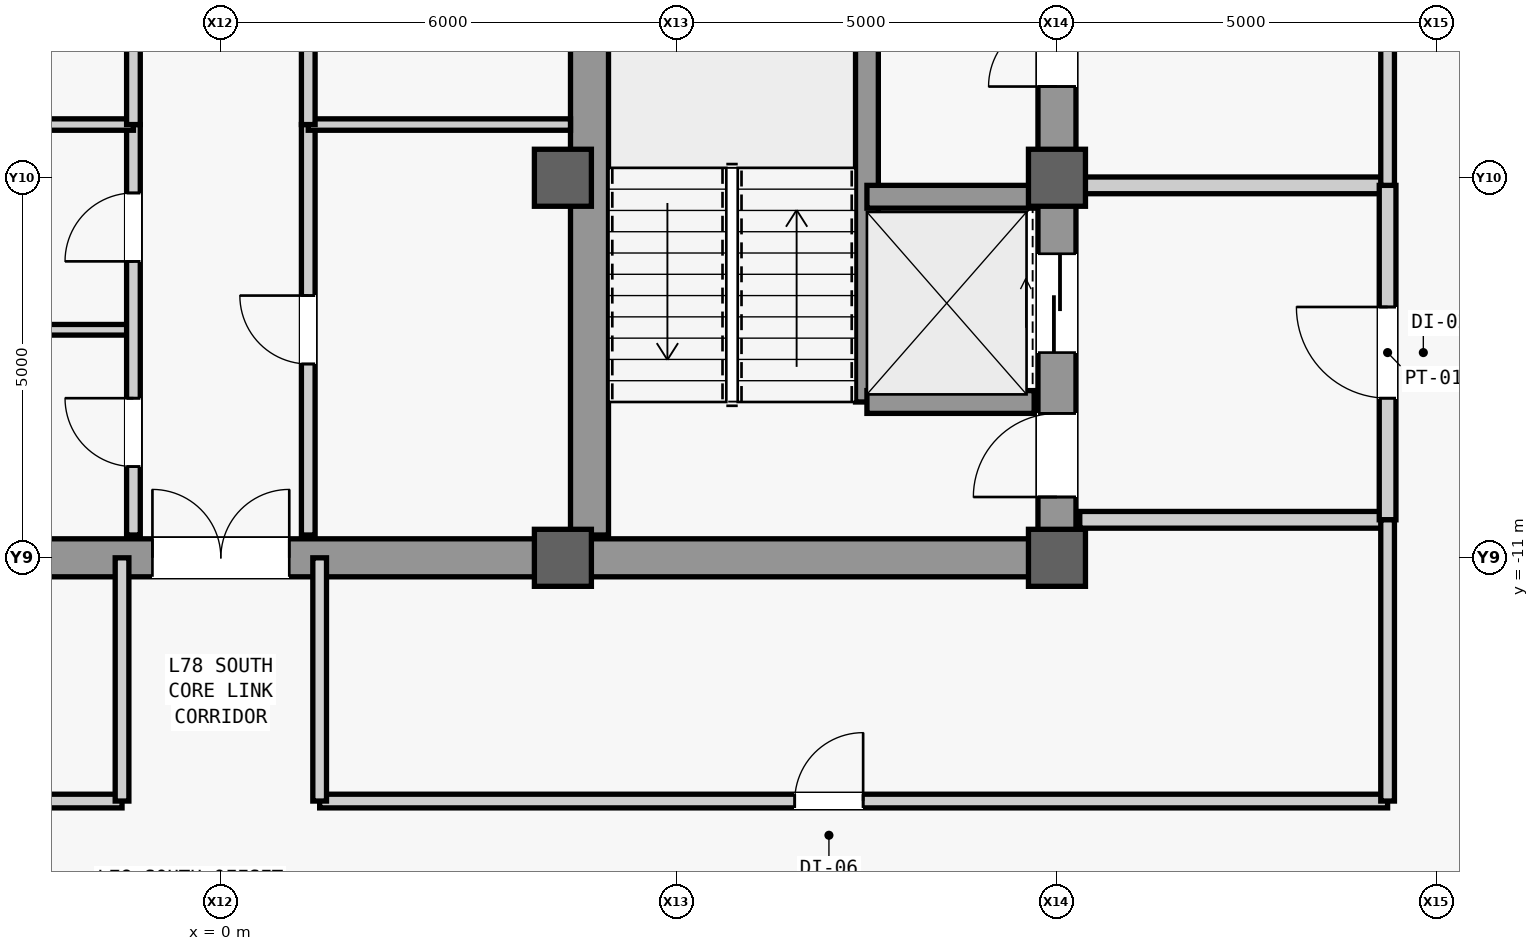
"""IFC4 building model, lengths in metres.
Left out: names, types, materials, properties, quantities, classifications, styles, units other than length and angle.
Written with IfcOpenShell. Run it as: python <this file> out.ifc"""

import sys

from ifc_helpers import new_model, si_unit, direction, frame, frame_2d, origin, origin_2d, place, context, subcontext, project, spatial, rectangle, extrude, source, transform, mapped, element, fill, save


model = new_model("IFC4")
c1 = context("Model", 3, precision=1e-05, world=origin(), true_north=direction((0.0, 1.0)))
c2 = subcontext(c1, "Body", "Model", "MODEL_VIEW")
j1 = project(units=[si_unit("LENGTHUNIT", "METRE"), si_unit("PLANEANGLEUNIT", "RADIAN")], contexts=[c1])
p1 = place(None, origin())
s1 = spatial("IfcSite", under=j1, at=p1, CompositionType="ELEMENT")
p2 = place(p1, origin())
s2 = spatial("IfcBuilding", under=s1, at=p2, CompositionType="ELEMENT")
p3 = place(p2, frame((0.0, 0.0, 330.3)))
s3 = spatial("IfcBuildingStorey", under=s2, at=p3, CompositionType="ELEMENT", Elevation=330.3)
m1 = source(origin(), c2, "Body", "SweptSolid", [
    extrude(rectangle(XDim=22.0, YDim=0.5, at=frame_2d((11.0, 0.0))), origin(), (0.0, 0.0, 1.0), 3.74),
])
p4 = place(p3, frame((11.0, -11.0, 0.0), z_axis=(0.0, 0.0, 1.0), x_axis=(0.0, 1.0, 0.0)))
e1 = element("IfcWall", 1, at=p4, inside=s3, PredefinedType="SHEAR", context=c2, shape_type="MappedRepresentation", body=[
    mapped(m1, transform((0.0, 0.0, 0.0), scale=1.0)),
])
m2 = source(origin(), c2, "Body", "SweptSolid", [
    extrude(rectangle(XDim=1.1, YDim=2.2, at=frame_2d((0.55, 1.1))), frame((0.0, 0.26, 0.0), z_axis=(0.0, -1.0, 0.0), x_axis=(1.0, 0.0, 0.0)), (0.0, 0.0, 1.0), 0.52),
])
p5 = place(p4, frame((0.8, 0.0, 0.0)))
e2 = element("IfcOpeningElement", 2, at=p5, cuts=e1, PredefinedType="OPENING", context=c2, shape_type="MappedRepresentation", body=[
    mapped(m2, transform((0.0, 0.0, 0.0), scale=1.0)),
])
m3 = source(origin(), c2, "Body", "SweptSolid", [
    extrude(rectangle(XDim=0.9, YDim=2.15, at=frame_2d((0.45, 1.075))), frame((0.0, 0.26, 0.0), z_axis=(0.0, -1.0, 0.0), x_axis=(1.0, 0.0, 0.0)), (0.0, 0.0, 1.0), 0.52),
])
p6 = place(p4, frame((6.2, 0.0, 0.0)))
e3 = element("IfcOpeningElement", 3, at=p6, cuts=e1, PredefinedType="OPENING", context=c2, shape_type="MappedRepresentation", body=[
    mapped(m3, transform((0.0, 0.0, 0.0), scale=1.0)),
])
p7 = place(p4, frame((8.05, 0.0, 0.0)))
e4 = element("IfcOpeningElement", 4, at=p7, cuts=e1, PredefinedType="OPENING", context=c2, shape_type="MappedRepresentation", body=[
    mapped(m3, transform((0.0, 0.0, 0.0), scale=1.0)),
])
m4 = source(origin(), c2, "Body", "SweptSolid", [
    extrude(rectangle(XDim=1.2, YDim=2.3, at=frame_2d((0.6, 1.15))), frame((0.0, 0.26, 0.0), z_axis=(0.0, -1.0, 0.0), x_axis=(1.0, 0.0, 0.0)), (0.0, 0.0, 1.0), 0.52),
])
p8 = place(p4, frame((17.6, 0.0, 0.0)))
e5 = element("IfcOpeningElement", 5, at=p8, cuts=e1, PredefinedType="OPENING", context=c2, shape_type="MappedRepresentation", body=[
    mapped(m4, transform((0.0, 0.0, 0.0), scale=1.0)),
])
p9 = place(p4, frame((19.6, 0.0, 0.0)))
e6 = element("IfcOpeningElement", 6, at=p9, cuts=e1, PredefinedType="OPENING", context=c2, shape_type="MappedRepresentation", body=[
    mapped(m4, transform((0.0, 0.0, 0.0), scale=1.0)),
])
m5 = source(origin(), c2, "Body", "SweptSolid", [
    extrude(rectangle(XDim=1.3, YDim=2.3, at=frame_2d((0.65, 1.15))), frame((0.0, 0.26, 0.0), z_axis=(0.0, -1.0, 0.0), x_axis=(1.0, 0.0, 0.0)), (0.0, 0.0, 1.0), 0.52),
])
p10 = place(p4, frame((2.7, 0.0, 0.0)))
e7 = element("IfcOpeningElement", 7, at=p10, cuts=e1, PredefinedType="OPENING", context=c2, shape_type="MappedRepresentation", body=[
    mapped(m5, transform((0.0, 0.0, 0.0), scale=1.0)),
])
p11 = place(p4, frame((13.35, 0.0, 0.0)))
e8 = element("IfcOpeningElement", 8, at=p11, cuts=e1, PredefinedType="OPENING", context=c2, shape_type="MappedRepresentation", body=[
    mapped(m5, transform((0.0, 0.0, 0.0), scale=1.0)),
])
m6 = source(origin(), c2, "Body", "SweptSolid", [
    extrude(rectangle(XDim=21.4, YDim=0.5, at=frame_2d((10.7, 0.0))), origin(), (0.0, 0.0, 1.0), 3.74),
])
p12 = place(p3, frame((4.85, -10.7, 0.0), z_axis=(0.0, 0.0, 1.0), x_axis=(0.0, 1.0, 0.0)))
e9 = element("IfcWall", 9, at=p12, inside=s3, PredefinedType="SHEAR", context=c2, shape_type="MappedRepresentation", body=[
    mapped(m6, transform((0.0, 0.0, 0.0), scale=1.0)),
])
m7 = source(origin(), c2, "Body", "SweptSolid", [
    extrude(rectangle(XDim=5.9, YDim=0.5, at=frame_2d((2.95, 0.0))), origin(), (0.0, 0.0, 1.0), 3.74),
])
p13 = place(p3, frame((4.85, -11.0, 0.0), z_axis=(0.0, 0.0, 1.0), x_axis=(1.0, 0.0, 0.0)))
e10 = element("IfcWall", 10, at=p13, inside=s3, PredefinedType="SHEAR", context=c2, shape_type="MappedRepresentation", body=[
    mapped(m7, transform((0.0, 0.0, 0.0), scale=1.0)),
])
m8 = source(origin(), c2, "Body", "SweptSolid", [
    extrude(rectangle(XDim=9.2, YDim=0.5, at=frame_2d((4.6, 0.0))), origin(), (0.0, 0.0, 1.0), 3.74),
])
p14 = place(p3, frame((-4.6, -11.0, 0.0), z_axis=(0.0, 0.0, 1.0), x_axis=(1.0, 0.0, 0.0)))
e11 = element("IfcWall", 11, at=p14, inside=s3, PredefinedType="SHEAR", context=c2, shape_type="MappedRepresentation", body=[
    mapped(m8, transform((0.0, 0.0, 0.0), scale=1.0)),
])
m9 = source(origin(), c2, "Body", "SweptSolid", [
    extrude(rectangle(XDim=1.8, YDim=2.25, at=frame_2d((0.9, 1.125))), frame((0.0, 0.26, 0.0), z_axis=(0.0, -1.0, 0.0), x_axis=(1.0, 0.0, 0.0)), (0.0, 0.0, 1.0), 0.52),
])
p15 = place(p14, frame((3.7, 0.0, 0.0)))
e12 = element("IfcOpeningElement", 12, at=p15, cuts=e11, PredefinedType="OPENING", context=c2, shape_type="MappedRepresentation", body=[
    mapped(m9, transform((0.0, 0.0, 0.0), scale=1.0)),
])
m10 = source(origin(), c2, "Body", "SweptSolid", [
    extrude(rectangle(XDim=0.75, YDim=0.75, at=origin_2d()), origin(), (0.0, 0.0, 1.0), 4.0),
])
for number, where, z_axis, x_axis in (
    (13, (4.5, -11.0, 0.0), (0.0, 0.0, 1.0), (1.0, 0.0, 0.0)),
    (14, (4.5, -6.0, 0.0), (0.0, 0.0, 1.0), (1.0, 0.0, 0.0)),
    (15, (11.0, -11.0, 0.0), (0.0, 0.0, 1.0), (1.0, 0.0, 0.0)),
    (16, (11.0, -6.0, 0.0), (0.0, 0.0, 1.0), (1.0, 0.0, 0.0)),
):
    element("IfcColumn", number, at=place(p3, frame(where, z_axis=z_axis, x_axis=x_axis)), inside=s3, PredefinedType="COLUMN", context=c2, shape_type="MappedRepresentation", body=[
        mapped(m10, transform((0.0, 0.0, 0.0), scale=1.0)),
    ])
m11 = source(origin(), c2, "Body", "SweptSolid", [
    extrude(rectangle(XDim=7.8, YDim=0.3, at=frame_2d((3.9, 0.0))), origin(), (0.0, 0.0, 1.0), 3.74),
])
p16 = place(p3, frame((8.5, -8.95, 0.0), z_axis=(0.0, 0.0, 1.0), x_axis=(0.0, 1.0, 0.0)))
e17 = element("IfcWall", 17, at=p16, inside=s3, PredefinedType="SHEAR", context=c2, shape_type="MappedRepresentation", body=[
    mapped(m11, transform((0.0, 0.0, 0.0), scale=1.0)),
])
m12 = source(origin(), c2, "Body", "SweptSolid", [
    extrude(rectangle(XDim=2.2, YDim=0.3, at=frame_2d((1.1, 0.0))), origin(), (0.0, 0.0, 1.0), 3.74),
])
for number, where, z_axis, x_axis in (
    (18, (8.5, -8.95, 0.0), (0.0, 0.0, 1.0), (1.0, 0.0, 0.0)),
    (19, (8.5, -6.25, 0.0), (0.0, 0.0, 1.0), (1.0, 0.0, 0.0)),
):
    element("IfcWall", number, at=place(p3, frame(where, z_axis=z_axis, x_axis=x_axis)), inside=s3, PredefinedType="SHEAR", context=c2, shape_type="MappedRepresentation", body=[
        mapped(m12, transform((0.0, 0.0, 0.0), scale=1.0)),
    ])
m13 = source(origin(), c2, "Body", "SweptSolid", [
    extrude(rectangle(XDim=4.05, YDim=0.22, at=frame_2d((2.025, 0.0))), origin(), (0.0, 0.0, 1.0), 3.74),
])
p17 = place(p3, frame((11.3, -10.5, 0.0), z_axis=(0.0, 0.0, 1.0), x_axis=(1.0, 0.0, 0.0)))
e20 = element("IfcWall", 20, at=p17, inside=s3, PredefinedType="PARTITIONING", context=c2, shape_type="MappedRepresentation", body=[
    mapped(m13, transform((0.0, 0.0, 0.0), scale=1.0)),
])
m14 = source(origin(), c2, "Body", "SweptSolid", [
    extrude(rectangle(XDim=4.05, YDim=0.22, at=frame_2d((2.025, 0.0))), origin(), (0.0, 0.0, 1.0), 3.124),
])
p18 = place(p3, frame((11.3, -6.1, 0.0), z_axis=(0.0, 0.0, 1.0), x_axis=(1.0, 0.0, 0.0)))
e21 = element("IfcWall", 21, at=p18, inside=s3, PredefinedType="PARTITIONING", context=c2, shape_type="MappedRepresentation", body=[
    mapped(m14, transform((0.0, 0.0, 0.0), scale=1.0)),
])
m15 = source(origin(), c2, "Body", "SweptSolid", [
    extrude(rectangle(XDim=4.4, YDim=0.22, at=frame_2d((2.2, 0.0))), origin(), (0.0, 0.0, 1.0), 3.74),
])
p19 = place(p3, frame((15.35, -10.5, 0.0), z_axis=(0.0, 0.0, 1.0), x_axis=(0.0, 1.0, 0.0)))
e22 = element("IfcWall", 22, at=p19, inside=s3, PredefinedType="PARTITIONING", context=c2, shape_type="MappedRepresentation", body=[
    mapped(m15, transform((0.0, 0.0, 0.0), scale=1.0)),
])
m16 = source(origin(), c2, "Body", "SweptSolid", [
    extrude(rectangle(XDim=1.2, YDim=2.2, at=frame_2d((0.6, 1.1))), frame((0.0, 0.12, 0.0), z_axis=(0.0, -1.0, 0.0), x_axis=(1.0, 0.0, 0.0)), (0.0, 0.0, 1.0), 0.24),
])
p20 = place(p19, frame((1.6, 0.0, 0.0)))
e23 = element("IfcOpeningElement", 23, at=p20, cuts=e22, PredefinedType="OPENING", context=c2, shape_type="MappedRepresentation", body=[
    mapped(m16, transform((0.0, 0.0, 0.0), scale=1.0)),
])
m17 = source(origin(), c2, "Body", "SweptSolid", [
    extrude(rectangle(XDim=16.6, YDim=0.18, at=frame_2d((8.3, 0.0))), origin(), (0.0, 0.0, 1.0), 3.74),
])
p21 = place(p3, frame((15.35, -6.1, 0.0), z_axis=(0.0, 0.0, 1.0), x_axis=(0.0, 1.0, 0.0)))
e24 = element("IfcWall", 24, at=p21, inside=s3, PredefinedType="PARTITIONING", context=c2, shape_type="MappedRepresentation", body=[
    mapped(m17, transform((0.0, 0.0, 0.0), scale=1.0)),
])
m18 = source(origin(), c2, "Body", "SweptSolid", [
    extrude(rectangle(XDim=1.8, YDim=2.25, at=frame_2d((0.9, 1.125))), frame((0.0, 0.1, 0.0), z_axis=(0.0, -1.0, 0.0), x_axis=(1.0, 0.0, 0.0)), (0.0, 0.0, 1.0), 0.2),
])
p22 = place(p21, frame((2.7, 0.0, 0.0)))
e25 = element("IfcOpeningElement", 25, at=p22, cuts=e24, PredefinedType="OPENING", context=c2, shape_type="MappedRepresentation", body=[
    mapped(m18, transform((0.0, 0.0, 0.0), scale=1.0)),
])
p23 = place(p21, frame((13.0, 0.0, 0.0)))
e26 = element("IfcOpeningElement", 26, at=p23, cuts=e24, PredefinedType="OPENING", context=c2, shape_type="MappedRepresentation", body=[
    mapped(m18, transform((0.0, 0.0, 0.0), scale=1.0)),
])
m19 = source(origin(), c2, "Body", "SweptSolid", [
    extrude(rectangle(XDim=3.45, YDim=0.14, at=frame_2d((1.725, 0.0))), origin(), (0.0, 0.0, 1.0), 3.74),
])
p24 = place(p3, frame((-4.6, -8.0, 0.0), z_axis=(0.0, 0.0, 1.0), x_axis=(1.0, 0.0, 0.0)))
e27 = element("IfcWall", 27, at=p24, inside=s3, PredefinedType="PARTITIONING", context=c2, shape_type="MappedRepresentation", body=[
    mapped(m19, transform((0.0, 0.0, 0.0), scale=1.0)),
])
m20 = source(origin(), c2, "Body", "SweptSolid", [
    extrude(rectangle(XDim=5.4, YDim=0.18, at=frame_2d((2.7, 0.0))), origin(), (0.0, 0.0, 1.0), 3.74),
])
p25 = place(p3, frame((-1.15, -10.7, 0.0), z_axis=(0.0, 0.0, 1.0), x_axis=(0.0, 1.0, 0.0)))
e28 = element("IfcWall", 28, at=p25, inside=s3, PredefinedType="PARTITIONING", context=c2, shape_type="MappedRepresentation", body=[
    mapped(m20, transform((0.0, 0.0, 0.0), scale=1.0)),
])
m21 = source(origin(), c2, "Body", "SweptSolid", [
    extrude(rectangle(XDim=0.9, YDim=2.15, at=frame_2d((0.45, 1.075))), frame((0.0, 0.1, 0.0), z_axis=(0.0, -1.0, 0.0), x_axis=(1.0, 0.0, 0.0)), (0.0, 0.0, 1.0), 0.2),
])
p26 = place(p25, frame((0.9, 0.0, 0.0)))
e29 = element("IfcOpeningElement", 29, at=p26, cuts=e28, PredefinedType="OPENING", context=c2, shape_type="MappedRepresentation", body=[
    mapped(m21, transform((0.0, 0.0, 0.0), scale=1.0)),
])
p27 = place(p25, frame((3.6, 0.0, 0.0)))
e30 = element("IfcOpeningElement", 30, at=p27, cuts=e28, PredefinedType="OPENING", context=c2, shape_type="MappedRepresentation", body=[
    mapped(m21, transform((0.0, 0.0, 0.0), scale=1.0)),
])
p28 = place(p3, frame((1.15, -10.7, 0.0), z_axis=(0.0, 0.0, 1.0), x_axis=(0.0, 1.0, 0.0)))
e31 = element("IfcWall", 31, at=p28, inside=s3, PredefinedType="PARTITIONING", context=c2, shape_type="MappedRepresentation", body=[
    mapped(m20, transform((0.0, 0.0, 0.0), scale=1.0)),
])
p29 = place(p28, frame((2.25, 0.0, 0.0)))
e32 = element("IfcOpeningElement", 32, at=p29, cuts=e31, PredefinedType="OPENING", context=c2, shape_type="MappedRepresentation", body=[
    mapped(m21, transform((0.0, 0.0, 0.0), scale=1.0)),
])
m22 = source(origin(), c2, "Body", "SweptSolid", [
    extrude(rectangle(XDim=3.45, YDim=0.15, at=frame_2d((1.725, 0.0))), origin(), (0.0, 0.0, 1.0), 3.74),
])
for number, where, z_axis, x_axis in (
    (33, (-4.6, -5.3, 0.0), (0.0, 0.0, 1.0), (1.0, 0.0, 0.0)),
    (34, (1.15, -5.3, 0.0), (0.0, 0.0, 1.0), (1.0, 0.0, 0.0)),
):
    element("IfcWall", number, at=place(p3, frame(where, z_axis=z_axis, x_axis=x_axis)), inside=s3, PredefinedType="PARTITIONING", context=c2, shape_type="MappedRepresentation", body=[
        mapped(m22, transform((0.0, 0.0, 0.0), scale=1.0)),
    ])
m23 = source(origin(), c2, "Body", "SweptSolid", [
    extrude(rectangle(XDim=10.6, YDim=0.18, at=frame_2d((5.3, 0.0))), origin(), (0.0, 0.0, 1.0), 3.74),
])
p30 = place(p3, frame((-1.15, -5.3, 0.0), z_axis=(0.0, 0.0, 1.0), x_axis=(0.0, 1.0, 0.0)))
e35 = element("IfcWall", 35, at=p30, inside=s3, PredefinedType="PARTITIONING", context=c2, shape_type="MappedRepresentation", body=[
    mapped(m23, transform((0.0, 0.0, 0.0), scale=1.0)),
])
p31 = place(p30, frame((1.3, 0.0, 0.0)))
e36 = element("IfcOpeningElement", 36, at=p31, cuts=e35, PredefinedType="OPENING", context=c2, shape_type="MappedRepresentation", body=[
    mapped(m21, transform((0.0, 0.0, 0.0), scale=1.0)),
])
p32 = place(p30, frame((4.9, 0.0, 0.0)))
e37 = element("IfcOpeningElement", 37, at=p32, cuts=e35, PredefinedType="OPENING", context=c2, shape_type="MappedRepresentation", body=[
    mapped(m21, transform((0.0, 0.0, 0.0), scale=1.0)),
])
p33 = place(p30, frame((7.8, 0.0, 0.0)))
e38 = element("IfcOpeningElement", 38, at=p33, cuts=e35, PredefinedType="OPENING", context=c2, shape_type="MappedRepresentation", body=[
    mapped(m21, transform((0.0, 0.0, 0.0), scale=1.0)),
])
p34 = place(p30, frame((9.475, 0.0, 0.0)))
e39 = element("IfcOpeningElement", 39, at=p34, cuts=e35, PredefinedType="OPENING", context=c2, shape_type="MappedRepresentation", body=[
    mapped(m21, transform((0.0, 0.0, 0.0), scale=1.0)),
])
p35 = place(p3, frame((1.15, -5.3, 0.0), z_axis=(0.0, 0.0, 1.0), x_axis=(0.0, 1.0, 0.0)))
e40 = element("IfcWall", 40, at=p35, inside=s3, PredefinedType="PARTITIONING", context=c2, shape_type="MappedRepresentation", body=[
    mapped(m23, transform((0.0, 0.0, 0.0), scale=1.0)),
])
p36 = place(p35, frame((4.2, 0.0, 0.0)))
e41 = element("IfcOpeningElement", 41, at=p36, cuts=e40, PredefinedType="OPENING", context=c2, shape_type="MappedRepresentation", body=[
    mapped(m21, transform((0.0, 0.0, 0.0), scale=1.0)),
])
p37 = place(p35, frame((9.475, 0.0, 0.0)))
e42 = element("IfcOpeningElement", 42, at=p37, cuts=e40, PredefinedType="OPENING", context=c2, shape_type="MappedRepresentation", body=[
    mapped(m21, transform((0.0, 0.0, 0.0), scale=1.0)),
])
m24 = source(origin(), c2, "Body", "SweptSolid", [
    extrude(rectangle(XDim=16.1, YDim=0.18, at=frame_2d((8.05, 0.0))), origin(), (0.0, 0.0, 1.0), 3.74),
])
p38 = place(p3, frame((-17.4, -14.2, 0.0), z_axis=(0.0, 0.0, 1.0), x_axis=(1.0, 0.0, 0.0)))
e43 = element("IfcWall", 43, at=p38, inside=s3, PredefinedType="PARTITIONING", context=c2, shape_type="MappedRepresentation", body=[
    mapped(m24, transform((0.0, 0.0, 0.0), scale=1.0)),
])
p39 = place(p38, frame((8.95, 0.0, 0.0)))
e44 = element("IfcOpeningElement", 44, at=p39, cuts=e43, PredefinedType="OPENING", context=c2, shape_type="MappedRepresentation", body=[
    mapped(m21, transform((0.0, 0.0, 0.0), scale=1.0)),
])
m25 = source(origin(), c2, "Body", "SweptSolid", [
    extrude(rectangle(XDim=3.2, YDim=0.18, at=frame_2d((1.6, 0.0))), origin(), (0.0, 0.0, 1.0), 3.74),
])
p40 = place(p3, frame((-1.3, -14.2, 0.0), z_axis=(0.0, 0.0, 1.0), x_axis=(0.0, 1.0, 0.0)))
e45 = element("IfcWall", 45, at=p40, inside=s3, PredefinedType="PARTITIONING", context=c2, shape_type="MappedRepresentation", body=[
    mapped(m25, transform((0.0, 0.0, 0.0), scale=1.0)),
])
m26 = source(origin(), c2, "Body", "SweptSolid", [
    extrude(rectangle(XDim=14.05, YDim=0.18, at=frame_2d((7.025, 0.0))), origin(), (0.0, 0.0, 1.0), 3.74),
])
p41 = place(p3, frame((1.3, -14.2, 0.0), z_axis=(0.0, 0.0, 1.0), x_axis=(1.0, 0.0, 0.0)))
e46 = element("IfcWall", 46, at=p41, inside=s3, PredefinedType="PARTITIONING", context=c2, shape_type="MappedRepresentation", body=[
    mapped(m26, transform((0.0, 0.0, 0.0), scale=1.0)),
])
p42 = place(p41, frame((6.25, 0.0, 0.0)))
e47 = element("IfcOpeningElement", 47, at=p42, cuts=e46, PredefinedType="OPENING", context=c2, shape_type="MappedRepresentation", body=[
    mapped(m21, transform((0.0, 0.0, 0.0), scale=1.0)),
])
p43 = place(p3, frame((1.3, -14.2, 0.0), z_axis=(0.0, 0.0, 1.0), x_axis=(0.0, 1.0, 0.0)))
e48 = element("IfcWall", 48, at=p43, inside=s3, PredefinedType="PARTITIONING", context=c2, shape_type="MappedRepresentation", body=[
    mapped(m25, transform((0.0, 0.0, 0.0), scale=1.0)),
])
m27 = source(origin(), c2, "Body", "SweptSolid", [
    extrude(rectangle(XDim=3.7, YDim=0.18, at=frame_2d((1.85, 0.0))), origin(), (0.0, 0.0, 1.0), 3.74),
])
p44 = place(p3, frame((15.35, -14.2, 0.0), z_axis=(0.0, 0.0, 1.0), x_axis=(0.0, 1.0, 0.0)))
e49 = element("IfcWall", 49, at=p44, inside=s3, PredefinedType="PARTITIONING", context=c2, shape_type="MappedRepresentation", body=[
    mapped(m27, transform((0.0, 0.0, 0.0), scale=1.0)),
])
m28 = source(origin(), c2, "Body", "SweptSolid", [
    extrude(rectangle(XDim=1.1, YDim=2.2, at=frame_2d((0.55, 1.1))), frame((0.0, 0.025, 0.0), z_axis=(0.0, -1.0, 0.0), x_axis=(1.0, 0.0, 0.0)), (0.0, 0.0, 1.0), 0.05),
])
p45 = place(p5, origin())
e50 = element("IfcDoor", 50, at=p45, inside=s3, OperationType="SINGLE_SWING_LEFT", PredefinedType="DOOR", context=c2, shape_type="MappedRepresentation", body=[
    mapped(m28, transform((0.0, 0.0, 0.0), scale=1.0)),
])
fill(e2, e50)
m29 = source(origin(), c2, "Body", "SweptSolid", [
    extrude(rectangle(XDim=0.9, YDim=2.15, at=frame_2d((0.45, 1.075))), frame((0.0, 0.025, 0.0), z_axis=(0.0, -1.0, 0.0), x_axis=(1.0, 0.0, 0.0)), (0.0, 0.0, 1.0), 0.05),
])
p46 = place(p6, origin())
e51 = element("IfcDoor", 51, at=p46, inside=s3, OperationType="SINGLE_SWING_LEFT", PredefinedType="DOOR", context=c2, shape_type="MappedRepresentation", body=[
    mapped(m29, transform((0.0, 0.0, 0.0), scale=1.0)),
])
fill(e3, e51)
m30 = source(origin(), c2, "Body", "SweptSolid", [
    extrude(rectangle(XDim=1.2, YDim=2.2, at=frame_2d((0.6, 1.1))), frame((0.0, 0.025, 0.0), z_axis=(0.0, -1.0, 0.0), x_axis=(1.0, 0.0, 0.0)), (0.0, 0.0, 1.0), 0.05),
])
p47 = place(p20, origin())
e52 = element("IfcDoor", 52, at=p47, inside=s3, OperationType="SINGLE_SWING_RIGHT", PredefinedType="DOOR", context=c2, shape_type="MappedRepresentation", body=[
    mapped(m30, transform((0.0, 0.0, 0.0), scale=1.0)),
])
fill(e23, e52)
p48 = place(p26, origin())
e53 = element("IfcDoor", 53, at=p48, inside=s3, OperationType="SINGLE_SWING_RIGHT", PredefinedType="DOOR", context=c2, shape_type="MappedRepresentation", body=[
    mapped(m29, transform((0.0, 0.0, 0.0), scale=1.0)),
])
fill(e29, e53)
p49 = place(p27, origin())
e54 = element("IfcDoor", 54, at=p49, inside=s3, OperationType="SINGLE_SWING_LEFT", PredefinedType="DOOR", context=c2, shape_type="MappedRepresentation", body=[
    mapped(m29, transform((0.0, 0.0, 0.0), scale=1.0)),
])
fill(e30, e54)
p50 = place(p29, origin())
e55 = element("IfcDoor", 55, at=p50, inside=s3, OperationType="SINGLE_SWING_RIGHT", PredefinedType="DOOR", context=c2, shape_type="MappedRepresentation", body=[
    mapped(m29, transform((0.0, 0.0, 0.0), scale=1.0)),
])
fill(e32, e55)
m31 = source(origin(), c2, "Body", "SweptSolid", [
    extrude(rectangle(XDim=1.8, YDim=2.25, at=frame_2d((0.9, 1.125))), frame((0.0, 0.025, 0.0), z_axis=(0.0, -1.0, 0.0), x_axis=(1.0, 0.0, 0.0)), (0.0, 0.0, 1.0), 0.05),
])
p51 = place(p15, origin())
e56 = element("IfcDoor", 56, at=p51, inside=s3, OperationType="SINGLE_SWING_LEFT", PredefinedType="DOOR", context=c2, shape_type="MappedRepresentation", body=[
    mapped(m31, transform((0.0, 0.0, 0.0), scale=1.0)),
])
fill(e12, e56)
p52 = place(p42, origin())
e57 = element("IfcDoor", 57, at=p52, inside=s3, OperationType="SINGLE_SWING_RIGHT", PredefinedType="DOOR", context=c2, shape_type="MappedRepresentation", body=[
    mapped(m29, transform((0.0, 0.0, 0.0), scale=1.0)),
])
fill(e47, e57)
m32 = source(origin(), c2, "Body", "SweptSolid", [
    extrude(rectangle(XDim=1.3, YDim=2.3, at=frame_2d((0.65, 1.15))), frame((0.0, 0.025, 0.0), z_axis=(0.0, -1.0, 0.0), x_axis=(1.0, 0.0, 0.0)), (0.0, 0.0, 1.0), 0.05),
])
p53 = place(p10, origin())
e58 = element("IfcDoor", 58, at=p53, inside=s3, OperationType="SLIDING_TO_LEFT", PredefinedType="DOOR", context=c2, shape_type="MappedRepresentation", body=[
    mapped(m32, transform((0.0, 0.0, 0.0), scale=1.0)),
])
fill(e7, e58)
save(model, sys.argv[1])
